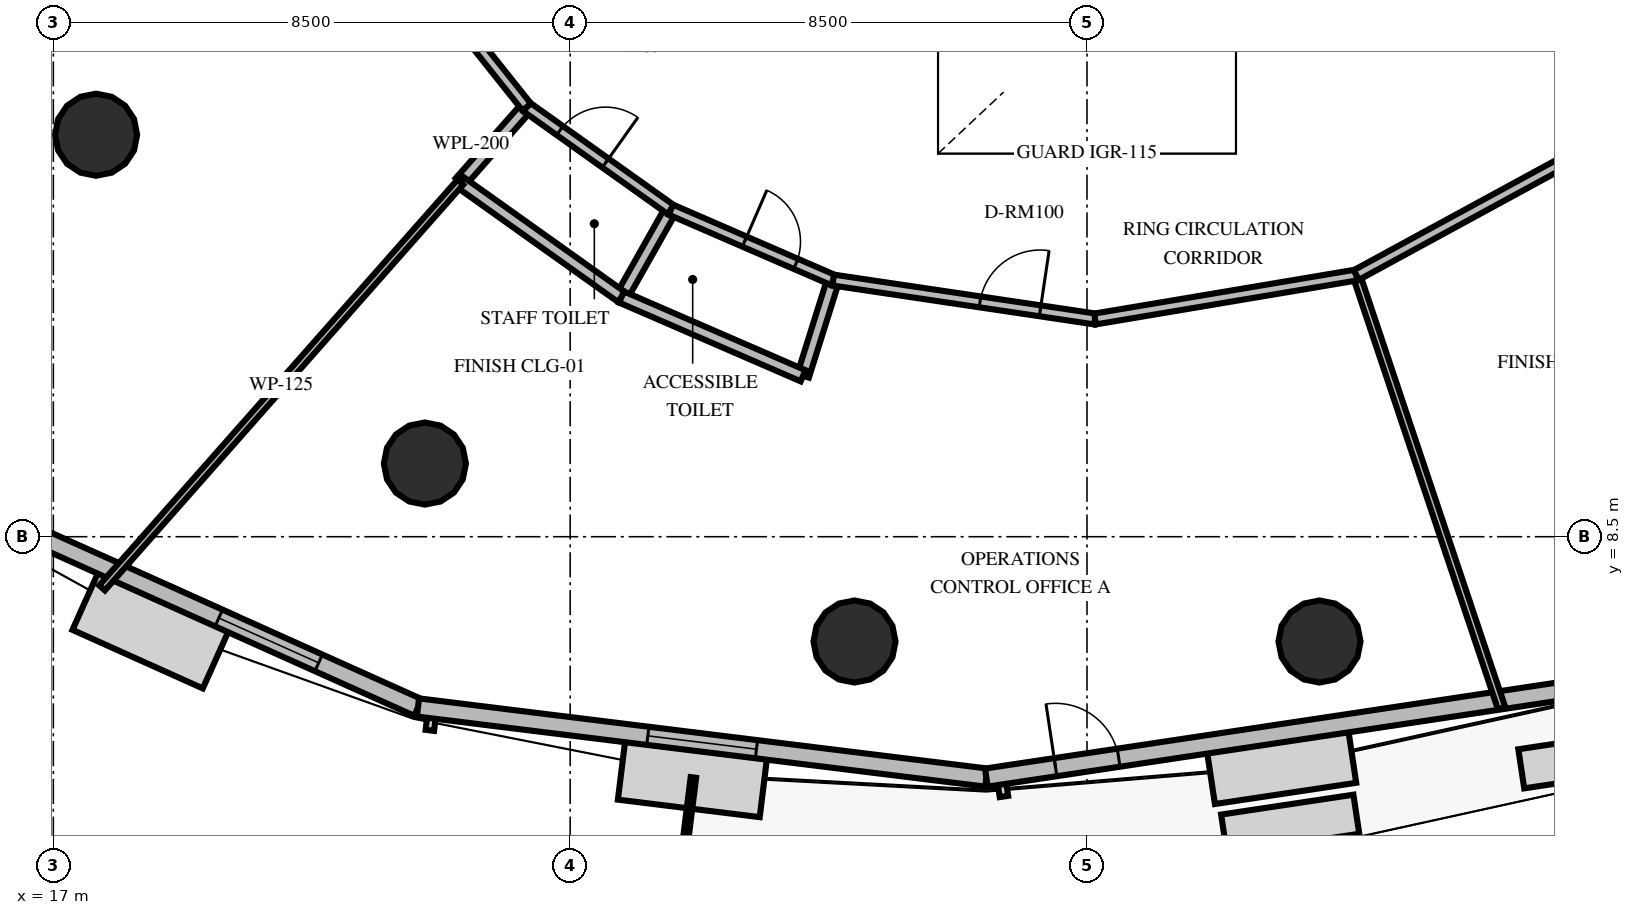
"""IFC4 building model, lengths in metres.
Left out: names, types, materials, properties, quantities, classifications, styles, units other than length and angle.
Written with IfcOpenShell. Run it as: python <this file> out.ifc"""

import sys

from ifc_helpers import new_model, si_unit, direction, frame, frame_2d, origin, origin_2d, place, context, subcontext, project, spatial, rectangle, circle, extrude, element, fill, save


model = new_model("IFC4")
c1 = context("Model", 3, precision=1e-05, world=origin(), true_north=direction((0.0, 1.0)))
c2 = subcontext(c1, "Body", "Model", "MODEL_VIEW")
j1 = project(units=[si_unit("LENGTHUNIT", "METRE"), si_unit("PLANEANGLEUNIT", "RADIAN")], contexts=[c1])
p1 = place(None, origin())
s1 = spatial("IfcSite", under=j1, at=p1, CompositionType="ELEMENT")
p2 = place(p1, origin())
s2 = spatial("IfcBuilding", under=s1, at=p2, CompositionType="ELEMENT")
p3 = place(p2, frame((0.0, 0.0, 67.8)))
s3 = spatial("IfcBuildingStorey", under=s2, at=p3, CompositionType="ELEMENT", Elevation=67.8)
for number, where, z_axis, x_axis in (
    (1, (17.703, 15.111, 0.0), (0.0, 0.0, 1.0), (1.0, 0.0, 0.0)),
    (2, (23.111, 9.703, 0.0), (0.0, 0.0, 1.0), (1.0, 0.0, 0.0)),
    (3, (30.176, 6.777, 0.0), (0.0, 0.0, 1.0), (1.0, 0.0, 0.0)),
    (4, (37.824, 6.777, 0.0), (0.0, 0.0, 1.0), (1.0, 0.0, 0.0)),
):
    element("IfcColumn", number, at=place(p3, frame(where, z_axis=z_axis, x_axis=x_axis)), inside=s3, PredefinedType="COLUMN", context=c2, shape_type="SweptSolid", body=[
        extrude(circle(Radius=0.675, at=origin_2d()), origin(), (0.0, 0.0, 1.0), 4.2),
    ])
p4 = place(p3, frame((14.976, 9.295, 0.0), z_axis=(0.0, 0.0, 1.0), x_axis=(0.912205999873, -0.409731880376, 0.0)))
e5 = element("IfcWall", 5, at=p4, inside=s3, PredefinedType="SOLIDWALL", context=c2, shape_type="SweptSolid", body=[
    extrude(rectangle(XDim=8.792, YDim=0.3, at=frame_2d((4.396, 0.0))), origin(), (0.0, 0.0, 1.0), 3.0),
])
p5 = place(p4, frame((5.202, 0.0, 0.8)))
e6 = element("IfcOpeningElement", 6, at=p5, cuts=e5, PredefinedType="OPENING", context=c2, shape_type="SweptSolid", body=[
    extrude(rectangle(XDim=1.8, YDim=1.95, at=frame_2d((0.9, 0.975))), frame((0.0, 0.16, 0.0), z_axis=(0.0, -1.0, 0.0), x_axis=(1.0, 0.0, 0.0)), (0.0, 0.0, 1.0), 0.32),
])
p6 = place(p3, frame((22.997, 5.692, 0.0), z_axis=(0.0, 0.0, 1.0), x_axis=(0.992477952792, -0.122423499466, 0.0)))
e7 = element("IfcWall", 7, at=p6, inside=s3, PredefinedType="SOLIDWALL", context=c2, shape_type="SweptSolid", body=[
    extrude(rectangle(XDim=9.419, YDim=0.3, at=frame_2d((4.709, 0.0))), origin(), (0.0, 0.0, 1.0), 3.0),
])
p7 = place(p6, frame((3.809, 0.0, 0.8)))
e8 = element("IfcOpeningElement", 8, at=p7, cuts=e7, PredefinedType="OPENING", context=c2, shape_type="SweptSolid", body=[
    extrude(rectangle(XDim=1.8, YDim=1.95, at=frame_2d((0.9, 0.975))), frame((0.0, 0.16, 0.0), z_axis=(0.0, -1.0, 0.0), x_axis=(1.0, 0.0, 0.0)), (0.0, 0.0, 1.0), 0.32),
])
p8 = place(p3, frame((32.345, 4.539, 0.0), z_axis=(0.0, 0.0, 1.0), x_axis=(0.988888262402, 0.148660702551, 0.0)))
e9 = element("IfcWall", 9, at=p8, inside=s3, PredefinedType="SOLIDWALL", context=c2, shape_type="SweptSolid", body=[
    extrude(rectangle(XDim=9.655, YDim=0.3, at=frame_2d((4.827, 0.0))), origin(), (0.0, 0.0, 1.0), 3.0),
])
p9 = place(p8, frame((1.15, 0.0, 0.0)))
e10 = element("IfcOpeningElement", 10, at=p9, cuts=e9, PredefinedType="OPENING", context=c2, shape_type="SweptSolid", body=[
    extrude(rectangle(XDim=1.05, YDim=2.15, at=frame_2d((0.525, 1.075))), frame((0.0, 0.16, 0.0), z_axis=(0.0, -1.0, 0.0), x_axis=(1.0, 0.0, 0.0)), (0.0, 0.0, 1.0), 0.32),
])
for number, where, z_axis, x_axis in (
    (11, (24.785, 15.566, 0.0), (0.0, 0.0, 1.0), (-0.662, -0.749, 0.0)),
    (12, (27.156, 13.879, 0.0), (0.0, 0.0, 1.0), (-0.492, -0.871, 0.0)),
):
    element("IfcWall", number, at=place(p3, frame(where, z_axis=z_axis, x_axis=x_axis)), inside=s3, PredefinedType="PLUMBINGWALL", context=c2, shape_type="SweptSolid", body=[
        extrude(rectangle(XDim=1.65, YDim=0.2, at=frame_2d((0.825, 0.0))), origin(), (0.0, 0.0, 1.0), 3.0),
    ])
p10 = place(p3, frame((23.693, 14.33, 0.0), z_axis=(0.0, 0.0, 1.0), x_axis=(0.814614334094, -0.580003005759, 0.0)))
e13 = element("IfcWall", 13, at=p10, inside=s3, PredefinedType="PLUMBINGWALL", context=c2, shape_type="SweptSolid", body=[
    extrude(rectangle(XDim=3.255, YDim=0.2, at=frame_2d((1.627, 0.0))), origin(), (0.0, 0.0, 1.0), 3.0),
])
p11 = place(p3, frame((24.785, 15.566, 0.0), z_axis=(0.0, 0.0, 1.0), x_axis=(0.814633812016, -0.57997564804, 0.0)))
e14 = element("IfcWall", 14, at=p11, inside=s3, PredefinedType="PARTITIONING", context=c2, shape_type="SweptSolid", body=[
    extrude(rectangle(XDim=2.91, YDim=0.18, at=frame_2d((1.455, 0.0))), origin(), (0.0, 0.0, 1.0), 3.0),
])
p12 = place(p11, frame((0.669, 0.0, 0.0)))
e15 = element("IfcOpeningElement", 15, at=p12, cuts=e14, PredefinedType="OPENING", context=c2, shape_type="SweptSolid", body=[
    extrude(rectangle(XDim=0.92, YDim=2.1, at=frame_2d((0.46, 1.05))), frame((0.0, 0.1, 0.0), z_axis=(0.0, -1.0, 0.0), x_axis=(1.0, 0.0, 0.0)), (0.0, 0.0, 1.0), 0.2),
])
p13 = place(p3, frame((29.826, 12.721, 0.0), z_axis=(0.0, 0.0, 1.0), x_axis=(-0.299757344977, -0.954015478979, 0.0)))
e16 = element("IfcWall", 16, at=p13, inside=s3, PredefinedType="PLUMBINGWALL", context=c2, shape_type="SweptSolid", body=[
    extrude(rectangle(XDim=1.65, YDim=0.2, at=frame_2d((0.825, 0.0))), origin(), (0.0, 0.0, 1.0), 3.0),
])
p14 = place(p3, frame((26.345, 12.442, 0.0), z_axis=(0.0, 0.0, 1.0), x_axis=(0.91740598036, -0.397952594162, 0.0)))
e17 = element("IfcWall", 17, at=p14, inside=s3, PredefinedType="PLUMBINGWALL", context=c2, shape_type="SweptSolid", body=[
    extrude(rectangle(XDim=3.255, YDim=0.2, at=frame_2d((1.627, 0.0))), origin(), (0.0, 0.0, 1.0), 3.0),
])
p15 = place(p3, frame((27.156, 13.879, 0.0), z_axis=(0.0, 0.0, 1.0), x_axis=(0.917417834148, -0.397925266334, 0.0)))
e18 = element("IfcWall", 18, at=p15, inside=s3, PredefinedType="PARTITIONING", context=c2, shape_type="SweptSolid", body=[
    extrude(rectangle(XDim=2.91, YDim=0.18, at=frame_2d((1.455, 0.0))), origin(), (0.0, 0.0, 1.0), 3.0),
])
p16 = place(p15, frame((1.321, 0.0, 0.0)))
e19 = element("IfcOpeningElement", 19, at=p16, cuts=e18, PredefinedType="OPENING", context=c2, shape_type="SweptSolid", body=[
    extrude(rectangle(XDim=0.92, YDim=2.1, at=frame_2d((0.46, 1.05))), frame((0.0, 0.1, 0.0), z_axis=(0.0, -1.0, 0.0), x_axis=(1.0, 0.0, 0.0)), (0.0, 0.0, 1.0), 0.2),
])
p17 = place(p3, frame((23.693, 14.33, 0.0), z_axis=(0.0, 0.0, 1.0), x_axis=(-0.661956342433, -0.749542394206, 0.0)))
e20 = element("IfcWall", 20, at=p17, inside=s3, PredefinedType="PARTITIONING", context=c2, shape_type="SweptSolid", body=[
    extrude(rectangle(XDim=8.9, YDim=0.125, at=frame_2d((4.45, 0.0))), origin(), (0.0, 0.0, 1.0), 3.0),
])
p18 = place(p3, frame((38.428, 12.803, 0.0), z_axis=(0.0, 0.0, 1.0), x_axis=(0.318127905721, -0.948047802382, 0.0)))
e21 = element("IfcWall", 21, at=p18, inside=s3, PredefinedType="PARTITIONING", context=c2, shape_type="SweptSolid", body=[
    extrude(rectangle(XDim=7.514, YDim=0.125, at=frame_2d((3.757, 0.0))), origin(), (0.0, 0.0, 1.0), 3.0),
])
p19 = place(p3, frame((29.826, 12.721, 0.0), z_axis=(0.0, 0.0, 1.0), x_axis=(0.989138956835, -0.146983414272, 0.0)))
e22 = element("IfcWall", 22, at=p19, inside=s3, PredefinedType="PARTITIONING", context=c2, shape_type="SweptSolid", body=[
    extrude(rectangle(XDim=4.355, YDim=0.18, at=frame_2d((2.178, 0.0))), origin(), (0.0, 0.0, 1.0), 3.0),
])
p20 = place(p19, frame((2.441, 0.0, 0.0)))
e23 = element("IfcOpeningElement", 23, at=p20, cuts=e22, PredefinedType="OPENING", context=c2, shape_type="SweptSolid", body=[
    extrude(rectangle(XDim=1.0, YDim=2.15, at=frame_2d((0.5, 1.075))), frame((0.0, 0.1, 0.0), z_axis=(0.0, -1.0, 0.0), x_axis=(1.0, 0.0, 0.0)), (0.0, 0.0, 1.0), 0.2),
])
p21 = place(p3, frame((34.134, 12.081, 0.0), z_axis=(0.0, 0.0, 1.0), x_axis=(0.986138216839, 0.165925939168, 0.0)))
e24 = element("IfcWall", 24, at=p21, inside=s3, PredefinedType="PARTITIONING", context=c2, shape_type="SweptSolid", body=[
    extrude(rectangle(XDim=4.355, YDim=0.18, at=frame_2d((2.178, 0.0))), origin(), (0.0, 0.0, 1.0), 3.0),
])
p22 = place(p3, frame((38.428, 12.803, 0.0), z_axis=(0.0, 0.0, 1.0), x_axis=(0.878385338365, 0.477953133001, 0.0)))
e25 = element("IfcWall", 25, at=p22, inside=s3, PredefinedType="PARTITIONING", context=c2, shape_type="SweptSolid", body=[
    extrude(rectangle(XDim=4.834, YDim=0.18, at=frame_2d((2.417, 0.0))), origin(), (0.0, 0.0, 1.0), 3.0),
])
p23 = place(p3, frame((21.773, 19.347, 0.0), z_axis=(0.0, 0.0, 1.0), x_axis=(0.623166544039, -0.782089162685, 0.0)))
e26 = element("IfcWall", 26, at=p23, inside=s3, PredefinedType="PARTITIONING", context=c2, shape_type="SweptSolid", body=[
    extrude(rectangle(XDim=4.834, YDim=0.18, at=frame_2d((2.417, 0.0))), origin(), (0.0, 0.0, 1.0), 3.0),
])
p24 = place(p5, origin())
e27 = element("IfcWindow", 27, at=p24, inside=s3, PartitioningType="SINGLE_PANEL", PredefinedType="WINDOW", context=c2, shape_type="SweptSolid", body=[
    extrude(rectangle(XDim=1.8, YDim=1.95, at=frame_2d((0.9, 0.975))), frame((0.0, 0.03, 0.0), z_axis=(0.0, -1.0, 0.0), x_axis=(1.0, 0.0, 0.0)), (0.0, 0.0, 1.0), 0.06),
])
fill(e6, e27)
p25 = place(p7, origin())
e28 = element("IfcWindow", 28, at=p25, inside=s3, PartitioningType="SINGLE_PANEL", PredefinedType="WINDOW", context=c2, shape_type="SweptSolid", body=[
    extrude(rectangle(XDim=1.8, YDim=1.95, at=frame_2d((0.9, 0.975))), frame((0.0, 0.03, 0.0), z_axis=(0.0, -1.0, 0.0), x_axis=(1.0, 0.0, 0.0)), (0.0, 0.0, 1.0), 0.06),
])
fill(e8, e28)
p26 = place(p9, origin())
e29 = element("IfcDoor", 29, at=p26, inside=s3, OperationType="SINGLE_SWING_LEFT", PredefinedType="DOOR", context=c2, shape_type="SweptSolid", body=[
    extrude(rectangle(XDim=1.05, YDim=2.15, at=frame_2d((0.525, 1.075))), frame((0.0, 0.025, 0.0), z_axis=(0.0, -1.0, 0.0), x_axis=(1.0, 0.0, 0.0)), (0.0, 0.0, 1.0), 0.05),
])
fill(e10, e29)
p27 = place(p12, origin())
e30 = element("IfcDoor", 30, at=p27, inside=s3, OperationType="SINGLE_SWING_RIGHT", PredefinedType="DOOR", context=c2, shape_type="SweptSolid", body=[
    extrude(rectangle(XDim=0.92, YDim=2.1, at=frame_2d((0.46, 1.05))), frame((0.0, 0.025, 0.0), z_axis=(0.0, -1.0, 0.0), x_axis=(1.0, 0.0, 0.0)), (0.0, 0.0, 1.0), 0.05),
])
fill(e15, e30)
p28 = place(p16, origin())
e31 = element("IfcDoor", 31, at=p28, inside=s3, OperationType="SINGLE_SWING_LEFT", PredefinedType="DOOR", context=c2, shape_type="SweptSolid", body=[
    extrude(rectangle(XDim=0.92, YDim=2.1, at=frame_2d((0.46, 1.05))), frame((0.0, 0.025, 0.0), z_axis=(0.0, -1.0, 0.0), x_axis=(1.0, 0.0, 0.0)), (0.0, 0.0, 1.0), 0.05),
])
fill(e19, e31)
p29 = place(p20, origin())
e32 = element("IfcDoor", 32, at=p29, inside=s3, OperationType="SINGLE_SWING_RIGHT", PredefinedType="DOOR", context=c2, shape_type="SweptSolid", body=[
    extrude(rectangle(XDim=1.0, YDim=2.15, at=frame_2d((0.5, 1.075))), frame((0.0, 0.025, 0.0), z_axis=(0.0, -1.0, 0.0), x_axis=(1.0, 0.0, 0.0)), (0.0, 0.0, 1.0), 0.05),
])
fill(e23, e32)
save(model, sys.argv[1])
